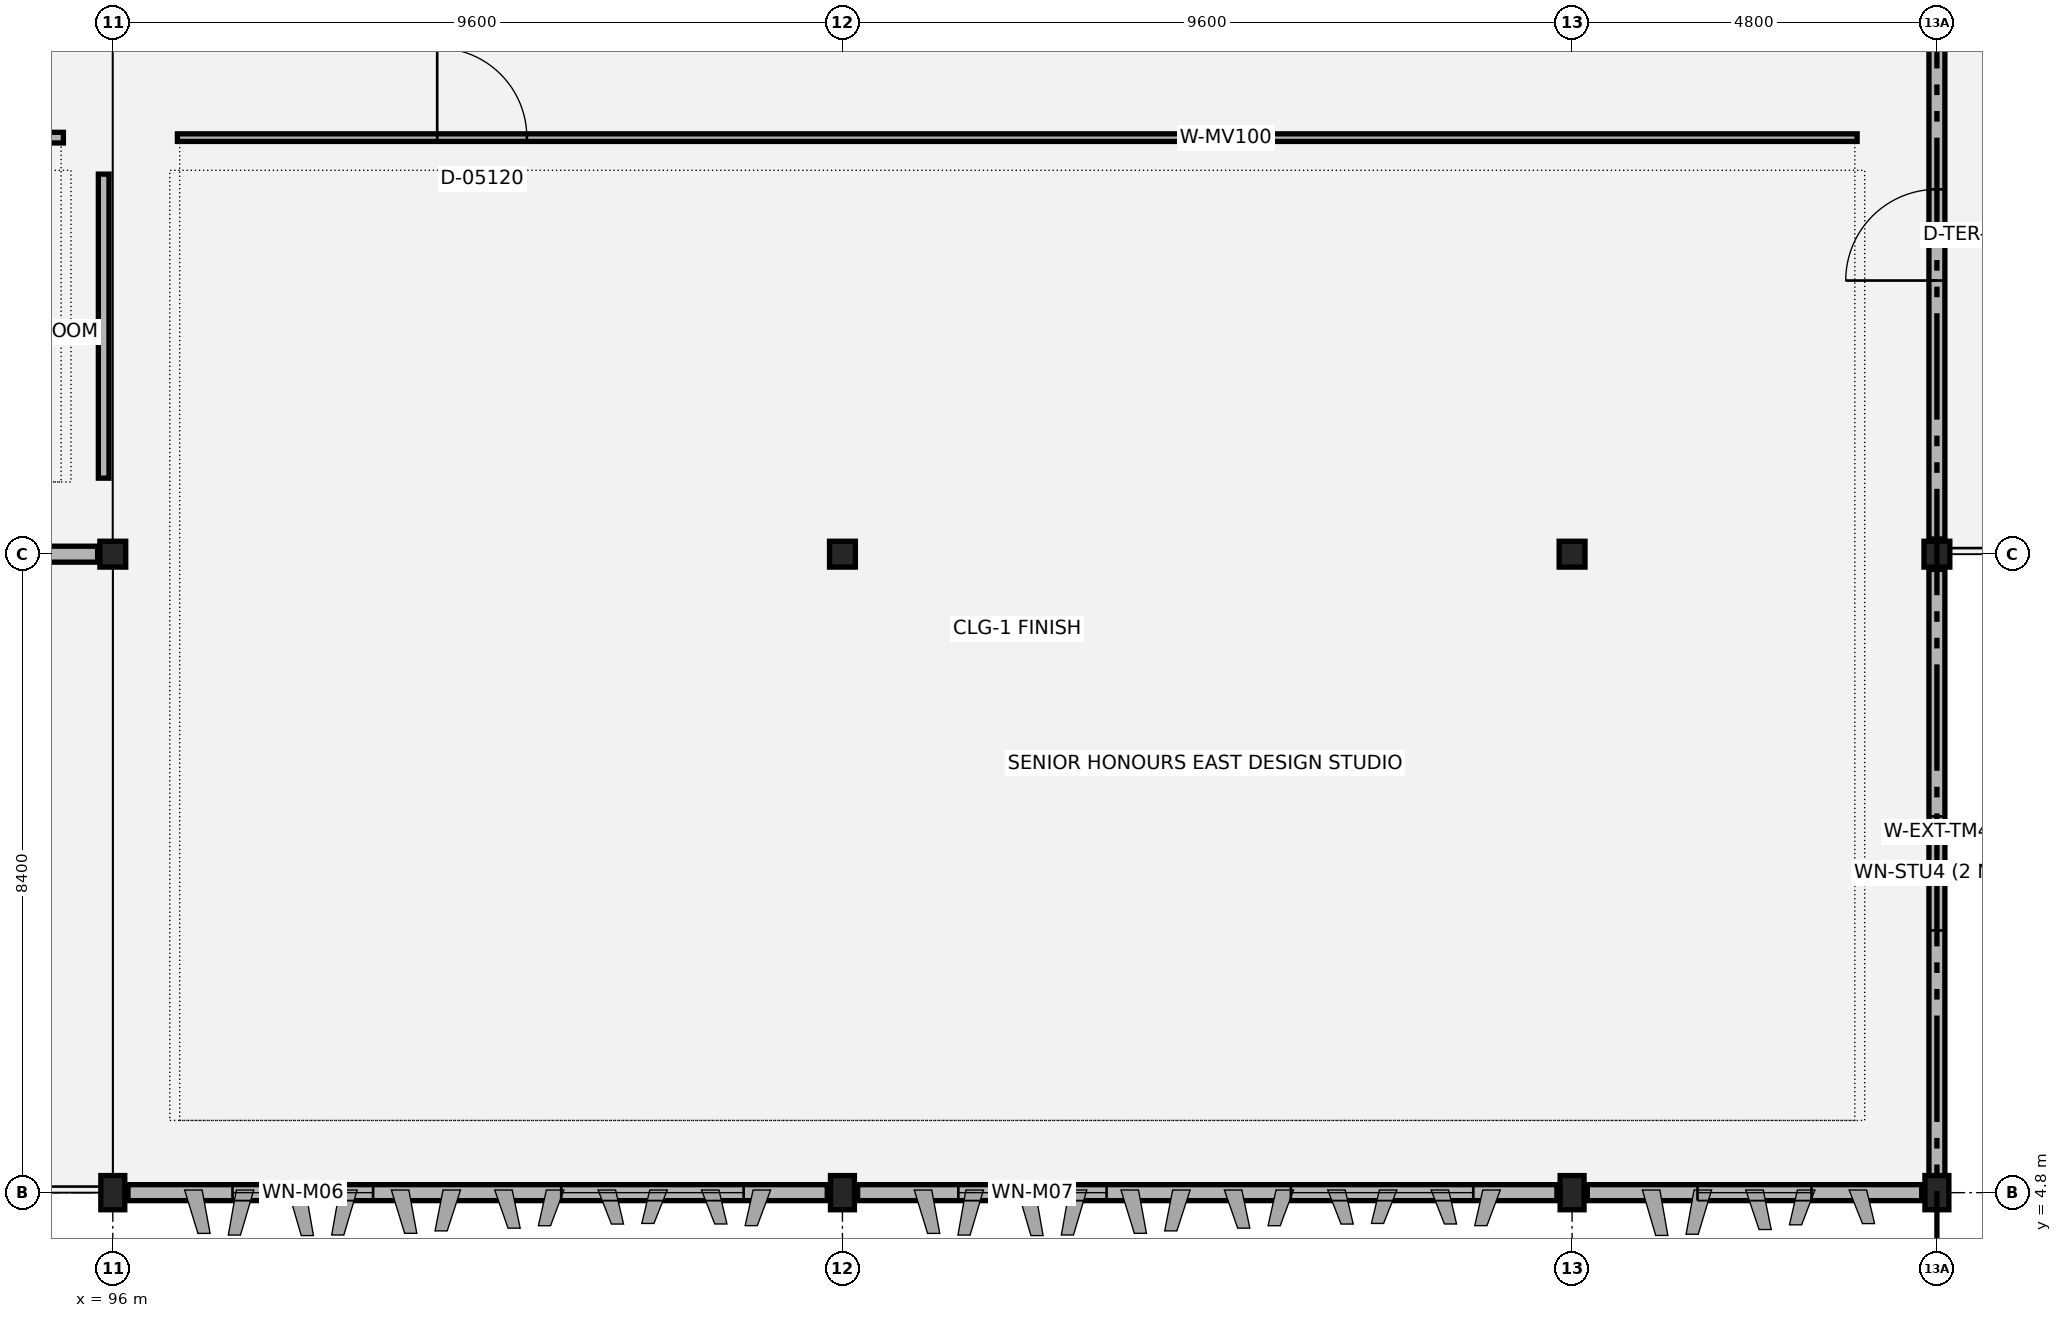
"""IFC4 building model, lengths in metres.
Left out: names, types, materials, properties, quantities, classifications, styles, units other than length and angle.
Written with IfcOpenShell. Run it as: python <this file> out.ifc"""

import sys

from ifc_helpers import new_model, si_unit, direction, frame, frame_2d, origin, origin_2d, place, context, subcontext, project, spatial, rectangle, extrude, element, fill, save


model = new_model("IFC4")
c1 = context("Model", 3, precision=1e-05, world=origin(), true_north=direction((0.0, 1.0)))
c2 = subcontext(c1, "Body", "Model", "MODEL_VIEW")
j1 = project(units=[si_unit("LENGTHUNIT", "METRE"), si_unit("PLANEANGLEUNIT", "RADIAN")], contexts=[c1])
p1 = place(None, origin())
s1 = spatial("IfcSite", under=j1, at=p1, CompositionType="ELEMENT")
p2 = place(p1, origin())
s2 = spatial("IfcBuilding", under=s1, at=p2, CompositionType="ELEMENT")
p3 = place(p2, frame((0.0, 0.0, 22.8)))
s3 = spatial("IfcBuildingStorey", under=s2, at=p3, CompositionType="ELEMENT", Elevation=22.8)
p4 = place(p3, frame((96.0, 4.8, 0.0), z_axis=(0.0, 0.0, 1.0), x_axis=(1.0, 0.0, 0.0)))
e1 = element("IfcColumn", 1, at=p4, inside=s3, PredefinedType="COLUMN", context=c2, shape_type="SweptSolid", body=[
    extrude(rectangle(XDim=0.315, YDim=0.45, at=origin_2d()), origin(), (0.0, 0.0, 1.0), 4.2),
])
p5 = place(p3, frame((96.0, 13.2, 0.0), z_axis=(0.0, 0.0, 1.0), x_axis=(1.0, 0.0, 0.0)))
e2 = element("IfcColumn", 2, at=p5, inside=s3, PredefinedType="COLUMN", context=c2, shape_type="SweptSolid", body=[
    extrude(rectangle(XDim=0.34, YDim=0.34, at=origin_2d()), origin(), (0.0, 0.0, 1.0), 4.2),
])
p6 = place(p3, frame((105.6, 4.8, 0.0), z_axis=(0.0, 0.0, 1.0), x_axis=(1.0, 0.0, 0.0)))
e3 = element("IfcColumn", 3, at=p6, inside=s3, PredefinedType="COLUMN", context=c2, shape_type="SweptSolid", body=[
    extrude(rectangle(XDim=0.315, YDim=0.45, at=origin_2d()), origin(), (0.0, 0.0, 1.0), 4.2),
])
p7 = place(p3, frame((105.6, 13.2, 0.0), z_axis=(0.0, 0.0, 1.0), x_axis=(1.0, 0.0, 0.0)))
e4 = element("IfcColumn", 4, at=p7, inside=s3, PredefinedType="COLUMN", context=c2, shape_type="SweptSolid", body=[
    extrude(rectangle(XDim=0.34, YDim=0.34, at=origin_2d()), origin(), (0.0, 0.0, 1.0), 4.2),
])
p8 = place(p3, frame((115.2, 4.8, 0.0), z_axis=(0.0, 0.0, 1.0), x_axis=(1.0, 0.0, 0.0)))
e5 = element("IfcColumn", 5, at=p8, inside=s3, PredefinedType="COLUMN", context=c2, shape_type="SweptSolid", body=[
    extrude(rectangle(XDim=0.315, YDim=0.45, at=origin_2d()), origin(), (0.0, 0.0, 1.0), 4.2),
])
p9 = place(p3, frame((115.2, 13.2, 0.0), z_axis=(0.0, 0.0, 1.0), x_axis=(1.0, 0.0, 0.0)))
e6 = element("IfcColumn", 6, at=p9, inside=s3, PredefinedType="COLUMN", context=c2, shape_type="SweptSolid", body=[
    extrude(rectangle(XDim=0.34, YDim=0.34, at=origin_2d()), origin(), (0.0, 0.0, 1.0), 4.2),
])
p10 = place(p3, frame((120.0, 4.8, 0.0), z_axis=(0.0, 0.0, 1.0), x_axis=(1.0, 0.0, 0.0)))
e7 = element("IfcColumn", 7, at=p10, inside=s3, PredefinedType="COLUMN", context=c2, shape_type="SweptSolid", body=[
    extrude(rectangle(XDim=0.315, YDim=0.45, at=origin_2d()), origin(), (0.0, 0.0, 1.0), 4.2),
])
p11 = place(p3, frame((120.0, 13.2, 0.0), z_axis=(0.0, 0.0, 1.0), x_axis=(1.0, 0.0, 0.0)))
e8 = element("IfcColumn", 8, at=p11, inside=s3, PredefinedType="COLUMN", context=c2, shape_type="SweptSolid", body=[
    extrude(rectangle(XDim=0.34, YDim=0.34, at=origin_2d()), origin(), (0.0, 0.0, 1.0), 4.2),
])
p12 = place(p3, frame((120.0, 5.0, 0.0), z_axis=(0.0, 0.0, 1.0), x_axis=(0.0, 1.0, 0.0)))
e9 = element("IfcWall", 9, at=p12, inside=s3, PredefinedType="SOLIDWALL", context=c2, shape_type="SweptSolid", body=[
    extrude(rectangle(XDim=8.0, YDim=0.21, at=frame_2d((4.0, 0.0))), origin(), (0.0, 0.0, 1.0), 3.07),
])
p13 = place(p12, frame((3.25, 0.0, 0.9)))
e10 = element("IfcOpeningElement", 10, at=p13, cuts=e9, PredefinedType="OPENING", context=c2, shape_type="SweptSolid", body=[
    extrude(rectangle(XDim=1.5, YDim=1.6, at=frame_2d((0.75, 0.8))), frame((0.0, 0.115, 0.0), z_axis=(0.0, -1.0, 0.0), x_axis=(1.0, 0.0, 0.0)), (0.0, 0.0, 1.0), 0.23),
])
p14 = place(p3, frame((96.2, 4.8, 0.0), z_axis=(0.0, 0.0, 1.0), x_axis=(1.0, 0.0, 0.0)))
e11 = element("IfcWall", 11, at=p14, inside=s3, PredefinedType="SOLIDWALL", context=c2, shape_type="SweptSolid", body=[
    extrude(rectangle(XDim=9.2, YDim=0.21, at=frame_2d((4.6, 0.0))), origin(), (0.0, 0.0, 1.0), 3.07),
])
p15 = place(p14, frame((1.375, 0.0, 0.9)))
e12 = element("IfcOpeningElement", 12, at=p15, cuts=e11, PredefinedType="OPENING", context=c2, shape_type="SweptSolid", body=[
    extrude(rectangle(XDim=1.85, YDim=1.55, at=frame_2d((0.925, 0.775))), frame((0.0, 0.115, 0.0), z_axis=(0.0, -1.0, 0.0), x_axis=(1.0, 0.0, 0.0)), (0.0, 0.0, 1.0), 0.23),
])
p16 = place(p14, frame((5.7, 0.0, 0.9)))
e13 = element("IfcOpeningElement", 13, at=p16, cuts=e11, PredefinedType="OPENING", context=c2, shape_type="SweptSolid", body=[
    extrude(rectangle(XDim=2.4, YDim=1.6, at=frame_2d((1.2, 0.8))), frame((0.0, 0.115, 0.0), z_axis=(0.0, -1.0, 0.0), x_axis=(1.0, 0.0, 0.0)), (0.0, 0.0, 1.0), 0.23),
])
p17 = place(p3, frame((105.8, 4.8, 0.0), z_axis=(0.0, 0.0, 1.0), x_axis=(1.0, 0.0, 0.0)))
e14 = element("IfcWall", 14, at=p17, inside=s3, PredefinedType="SOLIDWALL", context=c2, shape_type="SweptSolid", body=[
    extrude(rectangle(XDim=9.2, YDim=0.21, at=frame_2d((4.6, 0.0))), origin(), (0.0, 0.0, 1.0), 3.07),
])
p18 = place(p17, frame((1.325, 0.0, 0.9)))
e15 = element("IfcOpeningElement", 15, at=p18, cuts=e14, PredefinedType="OPENING", context=c2, shape_type="SweptSolid", body=[
    extrude(rectangle(XDim=1.95, YDim=1.6, at=frame_2d((0.975, 0.8))), frame((0.0, 0.115, 0.0), z_axis=(0.0, -1.0, 0.0), x_axis=(1.0, 0.0, 0.0)), (0.0, 0.0, 1.0), 0.23),
])
p19 = place(p17, frame((5.7, 0.0, 0.9)))
e16 = element("IfcOpeningElement", 16, at=p19, cuts=e14, PredefinedType="OPENING", context=c2, shape_type="SweptSolid", body=[
    extrude(rectangle(XDim=2.4, YDim=1.6, at=frame_2d((1.2, 0.8))), frame((0.0, 0.115, 0.0), z_axis=(0.0, -1.0, 0.0), x_axis=(1.0, 0.0, 0.0)), (0.0, 0.0, 1.0), 0.23),
])
p20 = place(p3, frame((115.4, 4.8, 0.0), z_axis=(0.0, 0.0, 1.0), x_axis=(1.0, 0.0, 0.0)))
e17 = element("IfcWall", 17, at=p20, inside=s3, PredefinedType="SOLIDWALL", context=c2, shape_type="SweptSolid", body=[
    extrude(rectangle(XDim=4.4, YDim=0.21, at=frame_2d((2.2, 0.0))), origin(), (0.0, 0.0, 1.0), 3.07),
])
p21 = place(p20, frame((1.45, 0.0, 0.9)))
e18 = element("IfcOpeningElement", 18, at=p21, cuts=e17, PredefinedType="OPENING", context=c2, shape_type="SweptSolid", body=[
    extrude(rectangle(XDim=1.5, YDim=1.6, at=frame_2d((0.75, 0.8))), frame((0.0, 0.115, 0.0), z_axis=(0.0, -1.0, 0.0), x_axis=(1.0, 0.0, 0.0)), (0.0, 0.0, 1.0), 0.23),
])
p22 = place(p3, frame((86.6, 13.2, 0.0), z_axis=(0.0, 0.0, 1.0), x_axis=(1.0, 0.0, 0.0)))
e19 = element("IfcWall", 19, at=p22, inside=s3, PredefinedType="SOLIDWALL", context=c2, shape_type="SweptSolid", body=[
    extrude(rectangle(XDim=9.2, YDim=0.21, at=frame_2d((4.6, 0.0))), origin(), (0.0, 0.0, 1.0), 3.07),
])
p23 = place(p22, frame((3.925, 0.0, 0.0)))
e20 = element("IfcOpeningElement", 20, at=p23, cuts=e19, PredefinedType="OPENING", context=c2, shape_type="SweptSolid", body=[
    extrude(rectangle(XDim=1.35, YDim=2.15, at=frame_2d((0.675, 1.075))), frame((0.0, 0.115, 0.0), z_axis=(0.0, -1.0, 0.0), x_axis=(1.0, 0.0, 0.0)), (0.0, 0.0, 1.0), 0.23),
])
p24 = place(p3, frame((120.0, 13.4, 0.0), z_axis=(0.0, 0.0, 1.0), x_axis=(0.0, 1.0, 0.0)))
e21 = element("IfcWall", 21, at=p24, inside=s3, PredefinedType="SOLIDWALL", context=c2, shape_type="SweptSolid", body=[
    extrude(rectangle(XDim=8.0, YDim=0.21, at=frame_2d((4.0, 0.0))), origin(), (0.0, 0.0, 1.0), 3.07),
])
p25 = place(p24, frame((3.4, 0.0, 0.0)))
e22 = element("IfcOpeningElement", 22, at=p25, cuts=e21, PredefinedType="OPENING", context=c2, shape_type="SweptSolid", body=[
    extrude(rectangle(XDim=1.2, YDim=2.15, at=frame_2d((0.6, 1.075))), frame((0.0, 0.115, 0.0), z_axis=(0.0, -1.0, 0.0), x_axis=(1.0, 0.0, 0.0)), (0.0, 0.0, 1.0), 0.23),
])
p26 = place(p3, frame((87.05, 18.68, 0.0), z_axis=(0.0, 0.0, 1.0), x_axis=(1.0, 0.0, 0.0)))
e23 = element("IfcWall", 23, at=p26, inside=s3, PredefinedType="PARTITIONING", context=c2, shape_type="SweptSolid", body=[
    extrude(rectangle(XDim=8.3, YDim=0.14, at=frame_2d((4.15, 0.0))), origin(), (0.0, 0.0, 1.0), 3.05),
])
p27 = place(p26, frame((3.63, 0.0, 0.0)))
e24 = element("IfcOpeningElement", 24, at=p27, cuts=e23, PredefinedType="OPENING", context=c2, shape_type="SweptSolid", body=[
    extrude(rectangle(XDim=1.04, YDim=2.15, at=frame_2d((0.52, 1.075))), frame((0.0, 0.08, 0.0), z_axis=(0.0, -1.0, 0.0), x_axis=(1.0, 0.0, 0.0)), (0.0, 0.0, 1.0), 0.16),
])
p28 = place(p3, frame((95.88, 14.2, 0.0), z_axis=(0.0, 0.0, 1.0), x_axis=(0.0, 1.0, 0.0)))
e25 = element("IfcWall", 25, at=p28, inside=s3, PredefinedType="PARTITIONING", context=c2, shape_type="SweptSolid", body=[
    extrude(rectangle(XDim=4.0, YDim=0.14, at=frame_2d((2.0, 0.0))), origin(), (0.0, 0.0, 1.0), 3.05),
])
p29 = place(p3, frame((96.85, 18.68, 0.0), z_axis=(0.0, 0.0, 1.0), x_axis=(1.0, 0.0, 0.0)))
e26 = element("IfcWall", 26, at=p29, inside=s3, PredefinedType="MOVABLE", context=c2, shape_type="SweptSolid", body=[
    extrude(rectangle(XDim=22.1, YDim=0.1, at=frame_2d((11.05, 0.0))), origin(), (0.0, 0.0, 1.0), 3.05),
])
p30 = place(p29, frame((3.418, 0.0, 0.0)))
e27 = element("IfcOpeningElement", 27, at=p30, cuts=e26, PredefinedType="OPENING", context=c2, shape_type="SweptSolid", body=[
    extrude(rectangle(XDim=1.18, YDim=2.15, at=frame_2d((0.59, 1.075))), frame((0.0, 0.06, 0.0), z_axis=(0.0, -1.0, 0.0), x_axis=(1.0, 0.0, 0.0)), (0.0, 0.0, 1.0), 0.12),
])
p31 = place(p13, origin())
e28 = element("IfcWindow", 28, at=p31, inside=s3, PartitioningType="SINGLE_PANEL", PredefinedType="WINDOW", context=c2, shape_type="SweptSolid", body=[
    extrude(rectangle(XDim=1.5, YDim=1.6, at=frame_2d((0.75, 0.8))), frame((0.0, 0.03, 0.0), z_axis=(0.0, -1.0, 0.0), x_axis=(1.0, 0.0, 0.0)), (0.0, 0.0, 1.0), 0.06),
])
fill(e10, e28)
p32 = place(p15, origin())
e29 = element("IfcWindow", 29, at=p32, inside=s3, PartitioningType="SINGLE_PANEL", PredefinedType="WINDOW", context=c2, shape_type="SweptSolid", body=[
    extrude(rectangle(XDim=1.85, YDim=1.55, at=frame_2d((0.925, 0.775))), frame((0.0, 0.03, 0.0), z_axis=(0.0, -1.0, 0.0), x_axis=(1.0, 0.0, 0.0)), (0.0, 0.0, 1.0), 0.06),
])
fill(e12, e29)
p33 = place(p16, origin())
e30 = element("IfcWindow", 30, at=p33, inside=s3, PartitioningType="SINGLE_PANEL", PredefinedType="WINDOW", context=c2, shape_type="SweptSolid", body=[
    extrude(rectangle(XDim=2.4, YDim=1.6, at=frame_2d((1.2, 0.8))), frame((0.0, 0.03, 0.0), z_axis=(0.0, -1.0, 0.0), x_axis=(1.0, 0.0, 0.0)), (0.0, 0.0, 1.0), 0.06),
])
fill(e13, e30)
p34 = place(p18, origin())
e31 = element("IfcWindow", 31, at=p34, inside=s3, PartitioningType="SINGLE_PANEL", PredefinedType="WINDOW", context=c2, shape_type="SweptSolid", body=[
    extrude(rectangle(XDim=1.95, YDim=1.6, at=frame_2d((0.975, 0.8))), frame((0.0, 0.03, 0.0), z_axis=(0.0, -1.0, 0.0), x_axis=(1.0, 0.0, 0.0)), (0.0, 0.0, 1.0), 0.06),
])
fill(e15, e31)
p35 = place(p19, origin())
e32 = element("IfcWindow", 32, at=p35, inside=s3, PartitioningType="SINGLE_PANEL", PredefinedType="WINDOW", context=c2, shape_type="SweptSolid", body=[
    extrude(rectangle(XDim=2.4, YDim=1.6, at=frame_2d((1.2, 0.8))), frame((0.0, 0.03, 0.0), z_axis=(0.0, -1.0, 0.0), x_axis=(1.0, 0.0, 0.0)), (0.0, 0.0, 1.0), 0.06),
])
fill(e16, e32)
p36 = place(p21, origin())
e33 = element("IfcWindow", 33, at=p36, inside=s3, PartitioningType="SINGLE_PANEL", PredefinedType="WINDOW", context=c2, shape_type="SweptSolid", body=[
    extrude(rectangle(XDim=1.5, YDim=1.6, at=frame_2d((0.75, 0.8))), frame((0.0, 0.03, 0.0), z_axis=(0.0, -1.0, 0.0), x_axis=(1.0, 0.0, 0.0)), (0.0, 0.0, 1.0), 0.06),
])
fill(e18, e33)
p37 = place(p25, origin())
e34 = element("IfcDoor", 34, at=p37, inside=s3, OperationType="SINGLE_SWING_LEFT", PredefinedType="DOOR", context=c2, shape_type="SweptSolid", body=[
    extrude(rectangle(XDim=1.2, YDim=2.15, at=frame_2d((0.6, 1.075))), frame((0.0, 0.025, 0.0), z_axis=(0.0, -1.0, 0.0), x_axis=(1.0, 0.0, 0.0)), (0.0, 0.0, 1.0), 0.05),
])
fill(e22, e34)
p38 = place(p30, origin())
e35 = element("IfcDoor", 35, at=p38, inside=s3, OperationType="SINGLE_SWING_LEFT", PredefinedType="DOOR", context=c2, shape_type="SweptSolid", body=[
    extrude(rectangle(XDim=1.18, YDim=2.15, at=frame_2d((0.59, 1.075))), frame((0.0, 0.025, 0.0), z_axis=(0.0, -1.0, 0.0), x_axis=(1.0, 0.0, 0.0)), (0.0, 0.0, 1.0), 0.05),
])
fill(e27, e35)
save(model, sys.argv[1])
